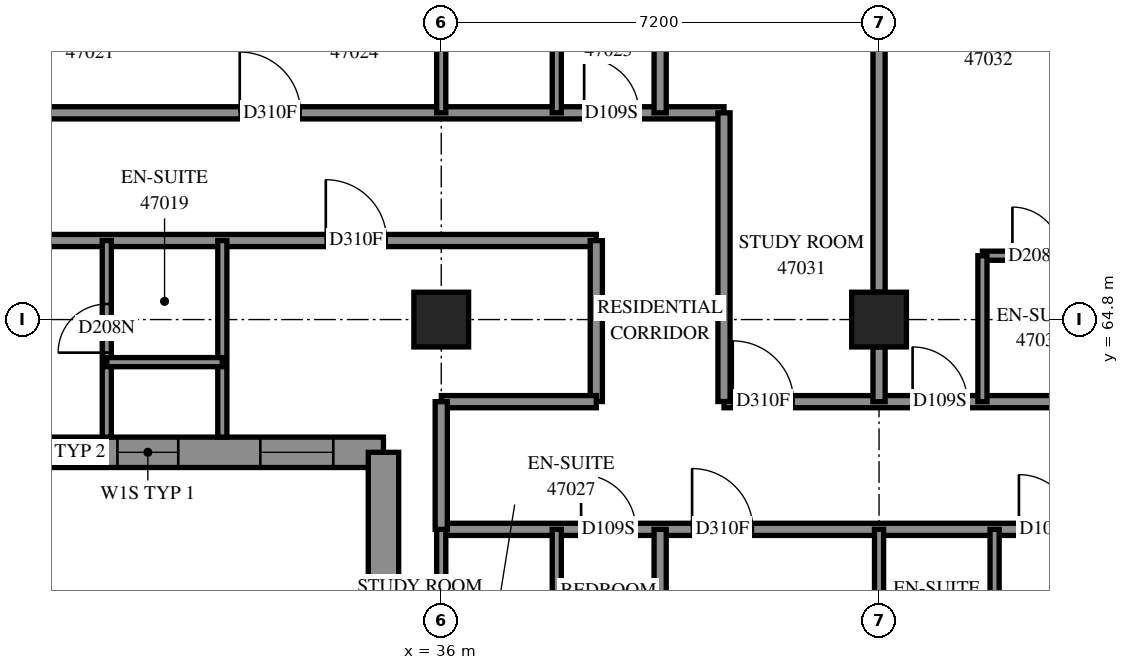
"""IFC4 building model, lengths in metres.
Left out: names, types, materials, properties, quantities, classifications, styles, units other than length and angle.
Written with IfcOpenShell. Run it as: python <this file> out.ifc"""

import sys

from ifc_helpers import new_model, si_unit, direction, frame, frame_2d, origin, origin_2d, place, context, subcontext, project, spatial, polyline, rectangle, outline, extrude, element, fill, save


model = new_model("IFC4")
c1 = context("Model", 3, precision=1e-05, world=origin(), true_north=direction((0.0, 1.0)))
c2 = subcontext(c1, "Body", "Model", "MODEL_VIEW")
j1 = project(units=[si_unit("LENGTHUNIT", "METRE"), si_unit("PLANEANGLEUNIT", "RADIAN")], contexts=[c1])
p1 = place(None, origin())
s1 = spatial("IfcSite", under=j1, at=p1, CompositionType="ELEMENT")
p2 = place(p1, origin())
s2 = spatial("IfcBuilding", under=s1, at=p2, CompositionType="ELEMENT")
p3 = place(p2, frame((0.0, 0.0, 172.8)))
s3 = spatial("IfcBuildingStorey", under=s2, at=p3, CompositionType="ELEMENT", Elevation=172.8)
for number, where, z_axis, x_axis in (
    (1, (36.0, 64.8, 0.0), (0.0, 0.0, 1.0), (1.0, 0.0, 0.0)),
    (2, (43.2, 64.8, 0.0), (0.0, 0.0, 1.0), (1.0, 0.0, 0.0)),
):
    element("IfcColumn", number, at=place(p3, frame(where, z_axis=z_axis, x_axis=x_axis)), inside=s3, PredefinedType="COLUMN", context=c2, shape_type="SweptSolid", body=[
        extrude(rectangle(XDim=0.9, YDim=0.9, at=origin_2d()), origin(), (0.0, 0.0, 1.0), 3.1),
    ])
p4 = place(p3, frame((19.417, 62.617, 0.0), z_axis=(0.0, 0.0, 1.0), x_axis=(1.0, 0.0, 0.0)))
e3 = element("IfcWall", 3, at=p4, inside=s3, PredefinedType="SOLIDWALL", context=c2, shape_type="SweptSolid", body=[
    extrude(outline(polyline([(-0.25, -0.25), (15.383, -0.25), (15.883, 0.25), (0.25, 0.25), (-0.25, -0.25)])), origin(), (0.0, 0.0, 1.0), 3.1),
])
p5 = place(p4, frame((2.583, 0.0, 0.45)))
e4 = element("IfcOpeningElement", 4, at=p5, cuts=e3, PredefinedType="OPENING", context=c2, shape_type="SweptSolid", body=[
    extrude(rectangle(XDim=2.8, YDim=2.5, at=frame_2d((1.4, 1.25))), frame((0.0, 0.26, 0.0), z_axis=(0.0, -1.0, 0.0), x_axis=(1.0, 0.0, 0.0)), (0.0, 0.0, 1.0), 0.52),
])
p6 = place(p4, frame((6.183, 0.0, 0.45)))
e5 = element("IfcOpeningElement", 5, at=p6, cuts=e3, PredefinedType="OPENING", context=c2, shape_type="SweptSolid", body=[
    extrude(rectangle(XDim=2.8, YDim=2.5, at=frame_2d((1.4, 1.25))), frame((0.0, 0.26, 0.0), z_axis=(0.0, -1.0, 0.0), x_axis=(1.0, 0.0, 0.0)), (0.0, 0.0, 1.0), 0.52),
])
p7 = place(p4, frame((0.717, 0.0, 0.45)))
e6 = element("IfcOpeningElement", 6, at=p7, cuts=e3, PredefinedType="OPENING", context=c2, shape_type="SweptSolid", body=[
    extrude(rectangle(XDim=1.2, YDim=2.5, at=frame_2d((0.6, 1.25))), frame((0.0, 0.26, 0.0), z_axis=(0.0, -1.0, 0.0), x_axis=(1.0, 0.0, 0.0)), (0.0, 0.0, 1.0), 0.52),
])
p8 = place(p4, frame((13.608, 0.0, 0.45)))
e7 = element("IfcOpeningElement", 7, at=p8, cuts=e3, PredefinedType="OPENING", context=c2, shape_type="SweptSolid", body=[
    extrude(rectangle(XDim=1.2, YDim=2.5, at=frame_2d((0.6, 1.25))), frame((0.0, 0.26, 0.0), z_axis=(0.0, -1.0, 0.0), x_axis=(1.0, 0.0, 0.0)), (0.0, 0.0, 1.0), 0.52),
])
p9 = place(p4, frame((9.608, 0.0, 0.45)))
e8 = element("IfcOpeningElement", 8, at=p9, cuts=e3, PredefinedType="OPENING", context=c2, shape_type="SweptSolid", body=[
    extrude(rectangle(XDim=1.3, YDim=2.5, at=frame_2d((0.65, 1.25))), frame((0.0, 0.26, 0.0), z_axis=(0.0, -1.0, 0.0), x_axis=(1.0, 0.0, 0.0)), (0.0, 0.0, 1.0), 0.52),
])
p10 = place(p4, frame((11.258, 0.0, 0.45)))
e9 = element("IfcOpeningElement", 9, at=p10, cuts=e3, PredefinedType="OPENING", context=c2, shape_type="SweptSolid", body=[
    extrude(rectangle(XDim=1.0, YDim=2.5, at=frame_2d((0.5, 1.25))), frame((0.0, 0.26, 0.0), z_axis=(0.0, -1.0, 0.0), x_axis=(1.0, 0.0, 0.0)), (0.0, 0.0, 1.0), 0.52),
])
p11 = place(p3, frame((35.05, 62.617, 0.0), z_axis=(0.0, 0.0, 1.0), x_axis=(0.0, -1.0, 0.0)))
e10 = element("IfcWall", 10, at=p11, inside=s3, PredefinedType="SOLIDWALL", context=c2, shape_type="SweptSolid", body=[
    extrude(outline(polyline([(0.25, -0.25), (6.217, -0.25), (5.717, 0.25), (-0.25, 0.25), (0.25, -0.25)])), origin(), (0.0, 0.0, 1.0), 3.1),
])
p12 = place(p11, frame((2.042, 0.0, 0.45)))
e11 = element("IfcOpeningElement", 11, at=p12, cuts=e10, PredefinedType="OPENING", context=c2, shape_type="SweptSolid", body=[
    extrude(rectangle(XDim=1.3, YDim=2.5, at=frame_2d((0.65, 1.25))), frame((0.0, 0.26, 0.0), z_axis=(0.0, -1.0, 0.0), x_axis=(1.0, 0.0, 0.0)), (0.0, 0.0, 1.0), 0.52),
])
p13 = place(p11, frame((3.792, 0.0, 0.45)))
e12 = element("IfcOpeningElement", 12, at=p13, cuts=e10, PredefinedType="OPENING", context=c2, shape_type="SweptSolid", body=[
    extrude(rectangle(XDim=0.8, YDim=2.5, at=frame_2d((0.4, 1.25))), frame((0.0, 0.26, 0.0), z_axis=(0.0, -1.0, 0.0), x_axis=(1.0, 0.0, 0.0)), (0.0, 0.0, 1.0), 0.52),
])
p14 = place(p3, frame((21.602, 68.2, 0.0), z_axis=(0.0, 0.0, 1.0), x_axis=(1.0, 0.0, 0.0)))
e13 = element("IfcWall", 13, at=p14, inside=s3, PredefinedType="PARTITIONING", context=c2, shape_type="SweptSolid", body=[
    extrude(rectangle(XDim=19.048, YDim=0.2, at=frame_2d((9.524, 0.0))), origin(), (0.0, 0.0, 1.0), 3.1),
])
p15 = place(p14, frame((3.998, 0.0, 0.0)))
e14 = element("IfcOpeningElement", 14, at=p15, cuts=e13, PredefinedType="OPENING", context=c2, shape_type="SweptSolid", body=[
    extrude(rectangle(XDim=0.9, YDim=2.1, at=frame_2d((0.45, 1.05))), frame((0.0, 0.11, 0.0), z_axis=(0.0, -1.0, 0.0), x_axis=(1.0, 0.0, 0.0)), (0.0, 0.0, 1.0), 0.22),
])
p16 = place(p14, frame((11.084, 0.0, 0.0)))
e15 = element("IfcOpeningElement", 15, at=p16, cuts=e13, PredefinedType="OPENING", context=c2, shape_type="SweptSolid", body=[
    extrude(rectangle(XDim=1.0, YDim=2.1, at=frame_2d((0.5, 1.05))), frame((0.0, 0.11, 0.0), z_axis=(0.0, -1.0, 0.0), x_axis=(1.0, 0.0, 0.0)), (0.0, 0.0, 1.0), 0.22),
])
p17 = place(p14, frame((16.748, 0.0, 0.0)))
e16 = element("IfcOpeningElement", 16, at=p17, cuts=e13, PredefinedType="OPENING", context=c2, shape_type="SweptSolid", body=[
    extrude(rectangle(XDim=0.9, YDim=2.1, at=frame_2d((0.45, 1.05))), frame((0.0, 0.11, 0.0), z_axis=(0.0, -1.0, 0.0), x_axis=(1.0, 0.0, 0.0)), (0.0, 0.0, 1.0), 0.22),
])
p18 = place(p3, frame((36.0, 61.35, 0.0), z_axis=(0.0, 0.0, 1.0), x_axis=(1.0, 0.0, 0.0)))
e17 = element("IfcWall", 17, at=p18, inside=s3, PredefinedType="PARTITIONING", context=c2, shape_type="SweptSolid", body=[
    extrude(rectangle(XDim=16.95, YDim=0.2, at=frame_2d((8.475, 0.0))), origin(), (0.0, 0.0, 1.0), 3.1),
])
p19 = place(p18, frame((2.3, 0.0, 0.0)))
e18 = element("IfcOpeningElement", 18, at=p19, cuts=e17, PredefinedType="OPENING", context=c2, shape_type="SweptSolid", body=[
    extrude(rectangle(XDim=0.9, YDim=2.1, at=frame_2d((0.45, 1.05))), frame((0.0, 0.11, 0.0), z_axis=(0.0, -1.0, 0.0), x_axis=(1.0, 0.0, 0.0)), (0.0, 0.0, 1.0), 0.22),
])
p20 = place(p18, frame((4.125, 0.0, 0.0)))
e19 = element("IfcOpeningElement", 19, at=p20, cuts=e17, PredefinedType="OPENING", context=c2, shape_type="SweptSolid", body=[
    extrude(rectangle(XDim=1.0, YDim=2.1, at=frame_2d((0.5, 1.05))), frame((0.0, 0.11, 0.0), z_axis=(0.0, -1.0, 0.0), x_axis=(1.0, 0.0, 0.0)), (0.0, 0.0, 1.0), 0.22),
])
p21 = place(p18, frame((9.5, 0.0, 0.0)))
e20 = element("IfcOpeningElement", 20, at=p21, cuts=e17, PredefinedType="OPENING", context=c2, shape_type="SweptSolid", body=[
    extrude(rectangle(XDim=0.9, YDim=2.1, at=frame_2d((0.45, 1.05))), frame((0.0, 0.11, 0.0), z_axis=(0.0, -1.0, 0.0), x_axis=(1.0, 0.0, 0.0)), (0.0, 0.0, 1.0), 0.22),
])
p22 = place(p18, frame((11.635, 0.0, 0.0)))
e21 = element("IfcOpeningElement", 21, at=p22, cuts=e17, PredefinedType="OPENING", context=c2, shape_type="SweptSolid", body=[
    extrude(rectangle(XDim=1.0, YDim=2.1, at=frame_2d((0.5, 1.05))), frame((0.0, 0.11, 0.0), z_axis=(0.0, -1.0, 0.0), x_axis=(1.0, 0.0, 0.0)), (0.0, 0.0, 1.0), 0.22),
])
p23 = place(p18, frame((15.803, 0.0, 0.0)))
e22 = element("IfcOpeningElement", 22, at=p23, cuts=e17, PredefinedType="OPENING", context=c2, shape_type="SweptSolid", body=[
    extrude(rectangle(XDim=1.0, YDim=2.1, at=frame_2d((0.5, 1.05))), frame((0.0, 0.11, 0.0), z_axis=(0.0, -1.0, 0.0), x_axis=(1.0, 0.0, 0.0)), (0.0, 0.0, 1.0), 0.22),
])
p24 = place(p3, frame((21.6, 66.1, 0.0), z_axis=(0.0, 0.0, 1.0), x_axis=(1.0, 0.0, 0.0)))
e23 = element("IfcWall", 23, at=p24, inside=s3, PredefinedType="PARTITIONING", context=c2, shape_type="SweptSolid", body=[
    extrude(rectangle(XDim=16.95, YDim=0.2, at=frame_2d((8.475, 0.0))), origin(), (0.0, 0.0, 1.0), 3.1),
])
p25 = place(p24, frame((0.546, 0.0, 0.0)))
e24 = element("IfcOpeningElement", 24, at=p25, cuts=e23, PredefinedType="OPENING", context=c2, shape_type="SweptSolid", body=[
    extrude(rectangle(XDim=0.9, YDim=2.1, at=frame_2d((0.45, 1.05))), frame((0.0, 0.11, 0.0), z_axis=(0.0, -1.0, 0.0), x_axis=(1.0, 0.0, 0.0)), (0.0, 0.0, 1.0), 0.22),
])
p26 = place(p24, frame((12.502, 0.0, 0.0)))
e25 = element("IfcOpeningElement", 25, at=p26, cuts=e23, PredefinedType="OPENING", context=c2, shape_type="SweptSolid", body=[
    extrude(rectangle(XDim=1.0, YDim=2.1, at=frame_2d((0.5, 1.05))), frame((0.0, 0.11, 0.0), z_axis=(0.0, -1.0, 0.0), x_axis=(1.0, 0.0, 0.0)), (0.0, 0.0, 1.0), 0.22),
])
p27 = place(p3, frame((40.65, 63.45, 0.0), z_axis=(0.0, 0.0, 1.0), x_axis=(1.0, 0.0, 0.0)))
e26 = element("IfcWall", 26, at=p27, inside=s3, PredefinedType="PARTITIONING", context=c2, shape_type="SweptSolid", body=[
    extrude(rectangle(XDim=9.75, YDim=0.2, at=frame_2d((4.875, 0.0))), origin(), (0.0, 0.0, 1.0), 3.1),
])
p28 = place(p27, frame((0.144, 0.0, 0.0)))
e27 = element("IfcOpeningElement", 27, at=p28, cuts=e26, PredefinedType="OPENING", context=c2, shape_type="SweptSolid", body=[
    extrude(rectangle(XDim=1.0, YDim=2.1, at=frame_2d((0.5, 1.05))), frame((0.0, 0.11, 0.0), z_axis=(0.0, -1.0, 0.0), x_axis=(1.0, 0.0, 0.0)), (0.0, 0.0, 1.0), 0.22),
])
p29 = place(p27, frame((3.102, 0.0, 0.0)))
e28 = element("IfcOpeningElement", 28, at=p29, cuts=e26, PredefinedType="OPENING", context=c2, shape_type="SweptSolid", body=[
    extrude(rectangle(XDim=0.9, YDim=2.1, at=frame_2d((0.45, 1.05))), frame((0.0, 0.11, 0.0), z_axis=(0.0, -1.0, 0.0), x_axis=(1.0, 0.0, 0.0)), (0.0, 0.0, 1.0), 0.22),
])
p30 = place(p27, frame((8.319, 0.0, 0.0)))
e29 = element("IfcOpeningElement", 29, at=p30, cuts=e26, PredefinedType="OPENING", context=c2, shape_type="SweptSolid", body=[
    extrude(rectangle(XDim=0.9, YDim=2.1, at=frame_2d((0.45, 1.05))), frame((0.0, 0.11, 0.0), z_axis=(0.0, -1.0, 0.0), x_axis=(1.0, 0.0, 0.0)), (0.0, 0.0, 1.0), 0.22),
])
p31 = place(p3, frame((43.2, 65.25, 0.0), z_axis=(0.0, 0.0, 1.0), x_axis=(0.0, 1.0, 0.0)))
e30 = element("IfcWall", 30, at=p31, inside=s3, PredefinedType="PARTITIONING", context=c2, shape_type="SweptSolid", body=[
    extrude(rectangle(XDim=6.3, YDim=0.2, at=frame_2d((3.15, 0.0))), origin(), (0.0, 0.0, 1.0), 3.1),
])
p32 = place(p3, frame((40.65, 63.452, 0.0), z_axis=(0.0, 0.0, 1.0), x_axis=(0.0, 1.0, 0.0)))
e31 = element("IfcWall", 31, at=p32, inside=s3, PredefinedType="PARTITIONING", context=c2, shape_type="SweptSolid", body=[
    extrude(rectangle(XDim=4.748, YDim=0.2, at=frame_2d((2.374, 0.0))), origin(), (0.0, 0.0, 1.0), 3.1),
])
p33 = place(p3, frame((39.6, 68.2, 0.0), z_axis=(0.0, 0.0, 1.0), x_axis=(0.0, 1.0, 0.0)))
e32 = element("IfcWall", 32, at=p33, inside=s3, PredefinedType="PARTITIONING", context=c2, shape_type="SweptSolid", body=[
    extrude(rectangle(XDim=4.719, YDim=0.2, at=frame_2d((2.359, 0.0))), origin(), (0.0, 0.0, 1.0), 3.1),
])
p34 = place(p3, frame((39.6, 56.9, 0.0), z_axis=(0.0, 0.0, 1.0), x_axis=(0.0, 1.0, 0.0)))
e33 = element("IfcWall", 33, at=p34, inside=s3, PredefinedType="PARTITIONING", context=c2, shape_type="SweptSolid", body=[
    extrude(rectangle(XDim=4.45, YDim=0.2, at=frame_2d((2.225, 0.0))), origin(), (0.0, 0.0, 1.0), 3.1),
])
p35 = place(p3, frame((44.9, 65.85, 0.0), z_axis=(0.0, 0.0, 1.0), x_axis=(1.0, 0.0, 0.0)))
e34 = element("IfcWall", 34, at=p35, inside=s3, PredefinedType="PARTITIONING", context=c2, shape_type="SweptSolid", body=[
    extrude(rectangle(XDim=3.8, YDim=0.15, at=frame_2d((1.9, 0.0))), origin(), (0.0, 0.0, 1.0), 3.1),
])
p36 = place(p35, frame((0.493, 0.0, 0.0)))
e35 = element("IfcOpeningElement", 35, at=p36, cuts=e34, PredefinedType="OPENING", context=c2, shape_type="SweptSolid", body=[
    extrude(rectangle(XDim=0.8, YDim=2.1, at=frame_2d((0.4, 1.05))), frame((0.0, 0.085, 0.0), z_axis=(0.0, -1.0, 0.0), x_axis=(1.0, 0.0, 0.0)), (0.0, 0.0, 1.0), 0.17),
])
p37 = place(p35, frame((2.507, 0.0, 0.0)))
e36 = element("IfcOpeningElement", 36, at=p37, cuts=e34, PredefinedType="OPENING", context=c2, shape_type="SweptSolid", body=[
    extrude(rectangle(XDim=0.8, YDim=2.1, at=frame_2d((0.4, 1.05))), frame((0.0, 0.085, 0.0), z_axis=(0.0, -1.0, 0.0), x_axis=(1.0, 0.0, 0.0)), (0.0, 0.0, 1.0), 0.17),
])
p38 = place(p3, frame((32.4, 62.867, 0.0), z_axis=(0.0, 0.0, 1.0), x_axis=(0.0, 1.0, 0.0)))
e37 = element("IfcWall", 37, at=p38, inside=s3, PredefinedType="PARTITIONING", context=c2, shape_type="SweptSolid", body=[
    extrude(rectangle(XDim=3.233, YDim=0.15, at=frame_2d((1.617, 0.0))), origin(), (0.0, 0.0, 1.0), 3.1),
])
p39 = place(p3, frame((30.5, 62.867, 0.0), z_axis=(0.0, 0.0, 1.0), x_axis=(0.0, 1.0, 0.0)))
e38 = element("IfcWall", 38, at=p39, inside=s3, PredefinedType="PARTITIONING", context=c2, shape_type="SweptSolid", body=[
    extrude(rectangle(XDim=3.233, YDim=0.15, at=frame_2d((1.617, 0.0))), origin(), (0.0, 0.0, 1.0), 3.1),
])
p40 = place(p39, frame((1.389, 0.0, 0.0)))
e39 = element("IfcOpeningElement", 39, at=p40, cuts=e38, PredefinedType="OPENING", context=c2, shape_type="SweptSolid", body=[
    extrude(rectangle(XDim=0.8, YDim=2.1, at=frame_2d((0.4, 1.05))), frame((0.0, 0.085, 0.0), z_axis=(0.0, -1.0, 0.0), x_axis=(1.0, 0.0, 0.0)), (0.0, 0.0, 1.0), 0.17),
])
p41 = place(p3, frame((38.55, 63.452, 0.0), z_axis=(0.0, 0.0, 1.0), x_axis=(0.0, 1.0, 0.0)))
e40 = element("IfcWall", 40, at=p41, inside=s3, PredefinedType="PARTITIONING", context=c2, shape_type="SweptSolid", body=[
    extrude(rectangle(XDim=2.646, YDim=0.2, at=frame_2d((1.323, 0.0))), origin(), (0.0, 0.0, 1.0), 3.1),
])
p42 = place(p3, frame((36.002, 63.45, 0.0), z_axis=(0.0, 0.0, 1.0), x_axis=(1.0, 0.0, 0.0)))
e41 = element("IfcWall", 41, at=p42, inside=s3, PredefinedType="PARTITIONING", context=c2, shape_type="SweptSolid", body=[
    extrude(rectangle(XDim=2.548, YDim=0.2, at=frame_2d((1.274, 0.0))), origin(), (0.0, 0.0, 1.0), 3.1),
])
p43 = place(p3, frame((37.9, 58.95, 0.0), z_axis=(0.0, 0.0, 1.0), x_axis=(0.0, 1.0, 0.0)))
e42 = element("IfcWall", 42, at=p43, inside=s3, PredefinedType="PARTITIONING", context=c2, shape_type="SweptSolid", body=[
    extrude(rectangle(XDim=2.4, YDim=0.15, at=frame_2d((1.2, 0.0))), origin(), (0.0, 0.0, 1.0), 3.1),
])
p44 = place(p3, frame((36.0, 58.95, 0.0), z_axis=(0.0, 0.0, 1.0), x_axis=(0.0, 1.0, 0.0)))
e43 = element("IfcWall", 43, at=p44, inside=s3, PredefinedType="PARTITIONING", context=c2, shape_type="SweptSolid", body=[
    extrude(rectangle(XDim=2.4, YDim=0.15, at=frame_2d((1.2, 0.0))), origin(), (0.0, 0.0, 1.0), 2.6),
])
for number, where, z_axis, x_axis in (
    (44, (45.1, 58.95, 0.0), (0.0, 0.0, 1.0), (0.0, 1.0, 0.0)),
    (45, (43.2, 58.95, 0.0), (0.0, 0.0, 1.0), (0.0, 1.0, 0.0)),
    (46, (37.9, 68.2, 0.0), (0.0, 0.0, 1.0), (0.0, 1.0, 0.0)),
    (47, (36.0, 68.2, 0.0), (0.0, 0.0, 1.0), (0.0, 1.0, 0.0)),
    (48, (44.9, 63.45, 0.0), (0.0, 0.0, 1.0), (0.0, 1.0, 0.0)),
):
    element("IfcWall", number, at=place(p3, frame(where, z_axis=z_axis, x_axis=x_axis)), inside=s3, PredefinedType="PARTITIONING", context=c2, shape_type="SweptSolid", body=[
        extrude(rectangle(XDim=2.4, YDim=0.15, at=frame_2d((1.2, 0.0))), origin(), (0.0, 0.0, 1.0), 3.1),
    ])
p45 = place(p3, frame((36.0, 61.35, 0.0), z_axis=(0.0, 0.0, 1.0), x_axis=(0.0, 1.0, 0.0)))
e49 = element("IfcWall", 49, at=p45, inside=s3, PredefinedType="PARTITIONING", context=c2, shape_type="SweptSolid", body=[
    extrude(rectangle(XDim=2.1, YDim=0.2, at=frame_2d((1.05, 0.0))), origin(), (0.0, 0.0, 1.0), 2.6),
])
p46 = place(p3, frame((30.5, 64.1, 0.0), z_axis=(0.0, 0.0, 1.0), x_axis=(1.0, 0.0, 0.0)))
e50 = element("IfcWall", 50, at=p46, inside=s3, PredefinedType="PARTITIONING", context=c2, shape_type="SweptSolid", body=[
    extrude(rectangle(XDim=1.9, YDim=0.15, at=frame_2d((0.95, 0.0))), origin(), (0.0, 0.0, 1.0), 3.1),
])
p47 = place(p3, frame((43.2, 63.45, 0.0), z_axis=(0.0, 0.0, 1.0), x_axis=(0.0, 1.0, 0.0)))
e51 = element("IfcWall", 51, at=p47, inside=s3, PredefinedType="PARTITIONING", context=c2, shape_type="SweptSolid", body=[
    extrude(rectangle(XDim=0.9, YDim=0.2, at=frame_2d((0.45, 0.0))), origin(), (0.0, 0.0, 1.0), 3.1),
])
p48 = place(p8, origin())
e52 = element("IfcWindow", 52, at=p48, inside=s3, PartitioningType="SINGLE_PANEL", PredefinedType="WINDOW", context=c2, shape_type="SweptSolid", body=[
    extrude(rectangle(XDim=1.2, YDim=2.5, at=frame_2d((0.6, 1.25))), frame((0.0, 0.18, 0.0), z_axis=(0.0, -1.0, 0.0), x_axis=(1.0, 0.0, 0.0)), (0.0, 0.0, 1.0), 0.06),
])
fill(e7, e52)
p49 = place(p40, origin())
e53 = element("IfcDoor", 53, at=p49, inside=s3, OperationType="SINGLE_SWING_RIGHT", PredefinedType="DOOR", context=c2, shape_type="SweptSolid", body=[
    extrude(rectangle(XDim=0.8, YDim=2.1, at=frame_2d((0.4, 1.05))), frame((0.0, 0.025, 0.0), z_axis=(0.0, -1.0, 0.0), x_axis=(1.0, 0.0, 0.0)), (0.0, 0.0, 1.0), 0.05),
])
fill(e39, e53)
p50 = place(p16, origin())
e54 = element("IfcDoor", 54, at=p50, inside=s3, OperationType="SINGLE_SWING_RIGHT", PredefinedType="DOOR", context=c2, shape_type="SweptSolid", body=[
    extrude(rectangle(XDim=1.0, YDim=2.1, at=frame_2d((0.5, 1.05))), frame((0.0, 0.025, 0.0), z_axis=(0.0, -1.0, 0.0), x_axis=(1.0, 0.0, 0.0)), (0.0, 0.0, 1.0), 0.05),
])
fill(e15, e54)
p51 = place(p17, origin())
e55 = element("IfcDoor", 55, at=p51, inside=s3, OperationType="SINGLE_SWING_RIGHT", PredefinedType="DOOR", context=c2, shape_type="SweptSolid", body=[
    extrude(rectangle(XDim=0.9, YDim=2.1, at=frame_2d((0.45, 1.05))), frame((0.0, 0.025, 0.0), z_axis=(0.0, -1.0, 0.0), x_axis=(1.0, 0.0, 0.0)), (0.0, 0.0, 1.0), 0.05),
])
fill(e16, e55)
p52 = place(p26, origin())
e56 = element("IfcDoor", 56, at=p52, inside=s3, OperationType="SINGLE_SWING_RIGHT", PredefinedType="DOOR", context=c2, shape_type="SweptSolid", body=[
    extrude(rectangle(XDim=1.0, YDim=2.1, at=frame_2d((0.5, 1.05))), frame((0.0, 0.025, 0.0), z_axis=(0.0, -1.0, 0.0), x_axis=(1.0, 0.0, 0.0)), (0.0, 0.0, 1.0), 0.05),
])
fill(e25, e56)
p53 = place(p19, origin())
e57 = element("IfcDoor", 57, at=p53, inside=s3, OperationType="SINGLE_SWING_LEFT", PredefinedType="DOOR", context=c2, shape_type="SweptSolid", body=[
    extrude(rectangle(XDim=0.9, YDim=2.1, at=frame_2d((0.45, 1.05))), frame((0.0, 0.025, 0.0), z_axis=(0.0, -1.0, 0.0), x_axis=(1.0, 0.0, 0.0)), (0.0, 0.0, 1.0), 0.05),
])
fill(e18, e57)
p54 = place(p20, origin())
e58 = element("IfcDoor", 58, at=p54, inside=s3, OperationType="SINGLE_SWING_RIGHT", PredefinedType="DOOR", context=c2, shape_type="SweptSolid", body=[
    extrude(rectangle(XDim=1.0, YDim=2.1, at=frame_2d((0.5, 1.05))), frame((0.0, 0.025, 0.0), z_axis=(0.0, -1.0, 0.0), x_axis=(1.0, 0.0, 0.0)), (0.0, 0.0, 1.0), 0.05),
])
fill(e19, e58)
p55 = place(p21, origin())
e59 = element("IfcDoor", 59, at=p55, inside=s3, OperationType="SINGLE_SWING_LEFT", PredefinedType="DOOR", context=c2, shape_type="SweptSolid", body=[
    extrude(rectangle(XDim=0.9, YDim=2.1, at=frame_2d((0.45, 1.05))), frame((0.0, 0.025, 0.0), z_axis=(0.0, -1.0, 0.0), x_axis=(1.0, 0.0, 0.0)), (0.0, 0.0, 1.0), 0.05),
])
fill(e20, e59)
p56 = place(p28, origin())
e60 = element("IfcDoor", 60, at=p56, inside=s3, OperationType="SINGLE_SWING_LEFT", PredefinedType="DOOR", context=c2, shape_type="SweptSolid", body=[
    extrude(rectangle(XDim=1.0, YDim=2.1, at=frame_2d((0.5, 1.05))), frame((0.0, 0.025, 0.0), z_axis=(0.0, -1.0, 0.0), x_axis=(1.0, 0.0, 0.0)), (0.0, 0.0, 1.0), 0.05),
])
fill(e27, e60)
p57 = place(p29, origin())
e61 = element("IfcDoor", 61, at=p57, inside=s3, OperationType="SINGLE_SWING_RIGHT", PredefinedType="DOOR", context=c2, shape_type="SweptSolid", body=[
    extrude(rectangle(XDim=0.9, YDim=2.1, at=frame_2d((0.45, 1.05))), frame((0.0, 0.025, 0.0), z_axis=(0.0, -1.0, 0.0), x_axis=(1.0, 0.0, 0.0)), (0.0, 0.0, 1.0), 0.05),
])
fill(e28, e61)
p58 = place(p36, origin())
e62 = element("IfcDoor", 62, at=p58, inside=s3, OperationType="SINGLE_SWING_RIGHT", PredefinedType="DOOR", context=c2, shape_type="SweptSolid", body=[
    extrude(rectangle(XDim=0.8, YDim=2.1, at=frame_2d((0.4, 1.05))), frame((0.0, 0.025, 0.0), z_axis=(0.0, -1.0, 0.0), x_axis=(1.0, 0.0, 0.0)), (0.0, 0.0, 1.0), 0.05),
])
fill(e35, e62)
p59 = place(p9, origin())
e63 = element("IfcWindow", 63, at=p59, inside=s3, PartitioningType="SINGLE_PANEL", PredefinedType="WINDOW", context=c2, shape_type="SweptSolid", body=[
    extrude(rectangle(XDim=1.3, YDim=2.5, at=frame_2d((0.65, 1.25))), frame((0.0, 0.18, 0.0), z_axis=(0.0, -1.0, 0.0), x_axis=(1.0, 0.0, 0.0)), (0.0, 0.0, 1.0), 0.06),
])
fill(e8, e63)
p60 = place(p10, origin())
e64 = element("IfcWindow", 64, at=p60, inside=s3, PartitioningType="SINGLE_PANEL", PredefinedType="WINDOW", context=c2, shape_type="SweptSolid", body=[
    extrude(rectangle(XDim=1.0, YDim=2.5, at=frame_2d((0.5, 1.25))), frame((0.0, 0.18, 0.0), z_axis=(0.0, -1.0, 0.0), x_axis=(1.0, 0.0, 0.0)), (0.0, 0.0, 1.0), 0.06),
])
fill(e9, e64)
p61 = place(p12, origin())
e65 = element("IfcWindow", 65, at=p61, inside=s3, PartitioningType="SINGLE_PANEL", PredefinedType="WINDOW", context=c2, shape_type="SweptSolid", body=[
    extrude(rectangle(XDim=1.3, YDim=2.5, at=frame_2d((0.65, 1.25))), frame((0.0, 0.18, 0.0), z_axis=(0.0, -1.0, 0.0), x_axis=(1.0, 0.0, 0.0)), (0.0, 0.0, 1.0), 0.06),
])
fill(e11, e65)
save(model, sys.argv[1])
